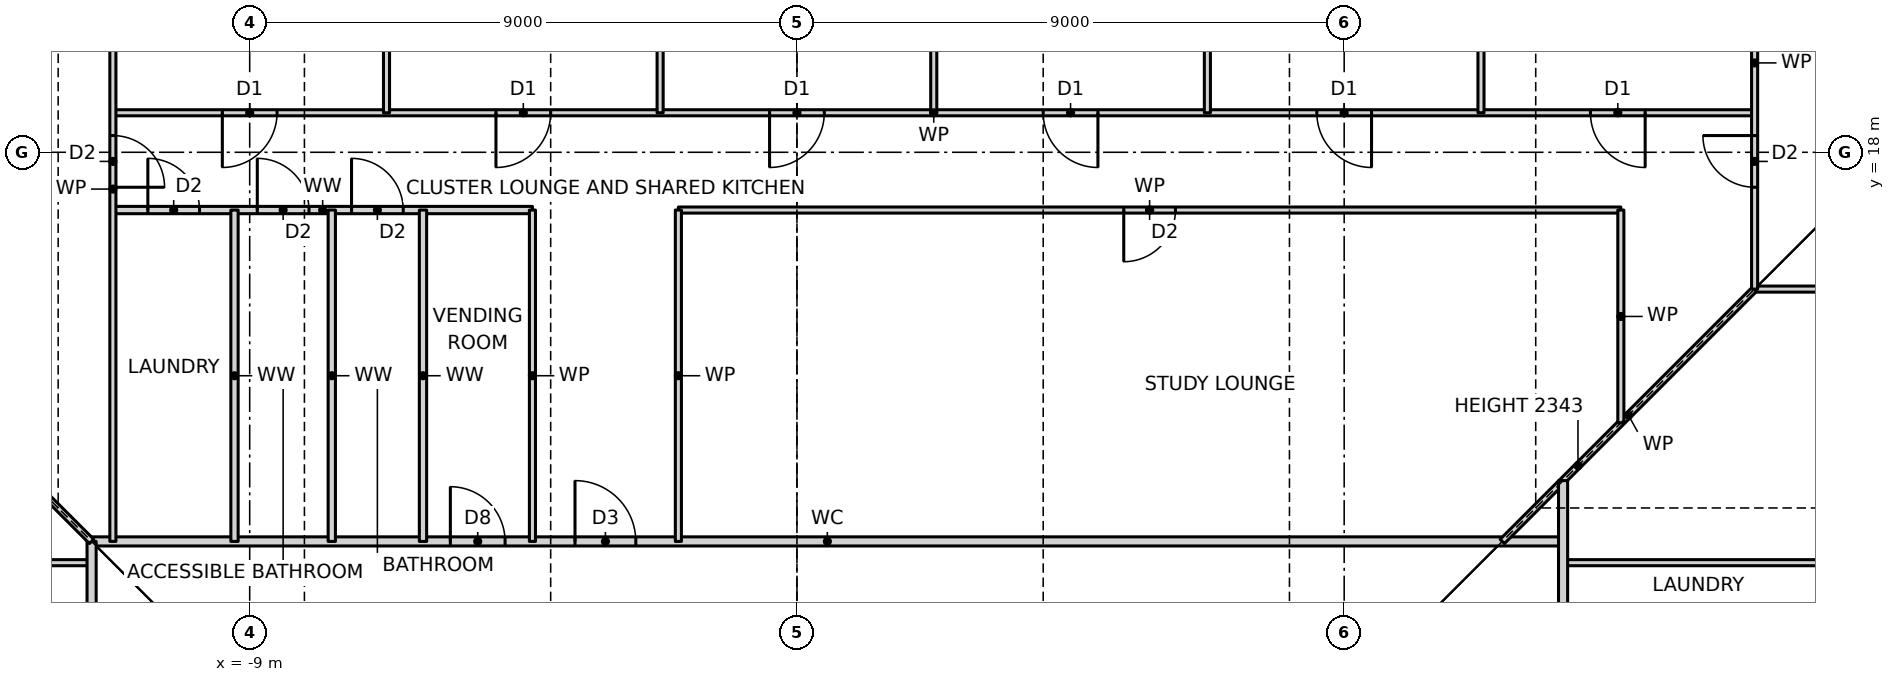
"""IFC4 building model, lengths in metres.
Left out: names, types, materials, properties, quantities, classifications, styles, units other than length and angle.
Written with IfcOpenShell. Run it as: python <this file> out.ifc"""

import sys

from ifc_helpers import new_model, si_unit, direction, frame, frame_2d, origin, place, context, subcontext, project, spatial, rectangle, extrude, element, fill, save


model = new_model("IFC4")
c1 = context("Model", 3, precision=1e-05, world=origin(), true_north=direction((0.0, 1.0)))
c2 = subcontext(c1, "Body", "Model", "MODEL_VIEW")
j1 = project(units=[si_unit("LENGTHUNIT", "METRE"), si_unit("PLANEANGLEUNIT", "RADIAN")], contexts=[c1])
p1 = place(None, origin())
s1 = spatial("IfcSite", under=j1, at=p1, CompositionType="ELEMENT")
p2 = place(p1, origin())
s2 = spatial("IfcBuilding", under=s1, at=p2, CompositionType="ELEMENT")
p3 = place(p2, frame((0.0, 0.0, 67.5)))
s3 = spatial("IfcBuildingStorey", under=s2, at=p3, CompositionType="ELEMENT", Elevation=67.5)
p4 = place(p3, frame((-23.19, 11.25, 0.0), z_axis=(0.0, 0.0, 1.0), x_axis=(1.0, 0.0, 0.0)))
e1 = element("IfcWall", 1, at=p4, inside=s3, PredefinedType="PARTITIONING", context=c2, shape_type="SweptSolid", body=[
    extrude(rectangle(XDim=11.59, YDim=0.1, at=frame_2d((5.795, 0.0))), origin(), (0.0, 0.0, 1.0), 3.27),
])
p5 = place(p4, frame((7.965, 0.0, 0.0)))
e2 = element("IfcOpeningElement", 2, at=p5, cuts=e1, PredefinedType="OPENING", context=c2, shape_type="SweptSolid", body=[
    extrude(rectangle(XDim=1.8, YDim=2.1, at=frame_2d((0.9, 1.05))), frame((0.0, 0.06, 0.0), z_axis=(0.0, -1.0, 0.0), x_axis=(1.0, 0.0, 0.0)), (0.0, 0.0, 1.0), 0.12),
])
p6 = place(p3, frame((12.6, 11.25, 0.0), z_axis=(0.0, 0.0, 1.0), x_axis=(1.0, 0.0, 0.0)))
e3 = element("IfcWall", 3, at=p6, inside=s3, PredefinedType="PARTITIONING", context=c2, shape_type="SweptSolid", body=[
    extrude(rectangle(XDim=10.59, YDim=0.1, at=frame_2d((5.295, 0.0))), origin(), (0.0, 0.0, 1.0), 3.27),
])
p7 = place(p6, frame((4.825, 0.0, 0.0)))
e4 = element("IfcOpeningElement", 4, at=p7, cuts=e3, PredefinedType="OPENING", context=c2, shape_type="SweptSolid", body=[
    extrude(rectangle(XDim=0.85, YDim=2.1, at=frame_2d((0.425, 1.05))), frame((0.0, 0.06, 0.0), z_axis=(0.0, -1.0, 0.0), x_axis=(1.0, 0.0, 0.0)), (0.0, 0.0, 1.0), 0.12),
])
p8 = place(p3, frame((-11.6, 11.6, 0.0), z_axis=(0.0, 0.0, 1.0), x_axis=(1.0, 0.0, 0.0)))
e5 = element("IfcWall", 5, at=p8, inside=s3, PredefinedType="PARTITIONING", context=c2, shape_type="SweptSolid", body=[
    extrude(rectangle(XDim=24.2, YDim=0.15, at=frame_2d((12.1, 0.0))), origin(), (0.0, 0.0, 1.0), 3.27),
])
p9 = place(p8, frame((7.95, 0.0, 0.0)))
e6 = element("IfcOpeningElement", 6, at=p9, cuts=e5, PredefinedType="OPENING", context=c2, shape_type="SweptSolid", body=[
    extrude(rectangle(XDim=1.0, YDim=2.1, at=frame_2d((0.5, 1.05))), frame((0.0, 0.085, 0.0), z_axis=(0.0, -1.0, 0.0), x_axis=(1.0, 0.0, 0.0)), (0.0, 0.0, 1.0), 0.17),
])
p10 = place(p8, frame((5.9, 0.0, 0.0)))
e7 = element("IfcOpeningElement", 7, at=p10, cuts=e5, PredefinedType="OPENING", context=c2, shape_type="SweptSolid", body=[
    extrude(rectangle(XDim=0.9, YDim=2.1, at=frame_2d((0.45, 1.05))), frame((0.0, 0.085, 0.0), z_axis=(0.0, -1.0, 0.0), x_axis=(1.0, 0.0, 0.0)), (0.0, 0.0, 1.0), 0.17),
])
p11 = place(p3, frame((15.75, 15.75, 0.0), z_axis=(0.0, 0.0, 1.0), x_axis=(1.0, 0.0, 0.0)))
e8 = element("IfcWall", 8, at=p11, inside=s3, PredefinedType="PARTITIONING", context=c2, shape_type="SweptSolid", body=[
    extrude(rectangle(XDim=7.44, YDim=0.1, at=frame_2d((3.72, 0.0))), origin(), (0.0, 0.0, 1.0), 3.27),
])
p12 = place(p3, frame((-11.25, 17.05, 0.0), z_axis=(0.0, 0.0, 1.0), x_axis=(1.0, 0.0, 0.0)))
e9 = element("IfcWall", 9, at=p12, inside=s3, PredefinedType="PARTITIONING", context=c2, shape_type="SweptSolid", body=[
    extrude(rectangle(XDim=6.9, YDim=0.12, at=frame_2d((3.45, 0.0))), origin(), (0.0, 0.0, 1.0), 3.27),
])
p13 = place(p12, frame((3.925, 0.0, 0.0)))
e10 = element("IfcOpeningElement", 10, at=p13, cuts=e9, PredefinedType="OPENING", context=c2, shape_type="SweptSolid", body=[
    extrude(rectangle(XDim=0.85, YDim=2.1, at=frame_2d((0.425, 1.05))), frame((0.0, 0.07, 0.0), z_axis=(0.0, -1.0, 0.0), x_axis=(1.0, 0.0, 0.0)), (0.0, 0.0, 1.0), 0.14),
])
p14 = place(p12, frame((2.375, 0.0, 0.0)))
e11 = element("IfcOpeningElement", 11, at=p14, cuts=e9, PredefinedType="OPENING", context=c2, shape_type="SweptSolid", body=[
    extrude(rectangle(XDim=0.85, YDim=2.1, at=frame_2d((0.425, 1.05))), frame((0.0, 0.07, 0.0), z_axis=(0.0, -1.0, 0.0), x_axis=(1.0, 0.0, 0.0)), (0.0, 0.0, 1.0), 0.14),
])
p15 = place(p12, frame((0.575, 0.0, 0.0)))
e12 = element("IfcOpeningElement", 12, at=p15, cuts=e9, PredefinedType="OPENING", context=c2, shape_type="SweptSolid", body=[
    extrude(rectangle(XDim=0.85, YDim=2.1, at=frame_2d((0.425, 1.05))), frame((0.0, 0.07, 0.0), z_axis=(0.0, -1.0, 0.0), x_axis=(1.0, 0.0, 0.0)), (0.0, 0.0, 1.0), 0.14),
])
p16 = place(p3, frame((-1.95, 17.05, 0.0), z_axis=(0.0, 0.0, 1.0), x_axis=(1.0, 0.0, 0.0)))
e13 = element("IfcWall", 13, at=p16, inside=s3, PredefinedType="PARTITIONING", context=c2, shape_type="SweptSolid", body=[
    extrude(rectangle(XDim=15.5, YDim=0.1, at=frame_2d((7.75, 0.0))), origin(), (0.0, 0.0, 1.0), 3.27),
])
p17 = place(p16, frame((7.325, 0.0, 0.0)))
e14 = element("IfcOpeningElement", 14, at=p17, cuts=e13, PredefinedType="OPENING", context=c2, shape_type="SweptSolid", body=[
    extrude(rectangle(XDim=0.85, YDim=2.1, at=frame_2d((0.425, 1.05))), frame((0.0, 0.06, 0.0), z_axis=(0.0, -1.0, 0.0), x_axis=(1.0, 0.0, 0.0)), (0.0, 0.0, 1.0), 0.12),
])
p18 = place(p3, frame((-11.25, 18.65, 0.0), z_axis=(0.0, 0.0, 1.0), x_axis=(1.0, 0.0, 0.0)))
e15 = element("IfcWall", 15, at=p18, inside=s3, PredefinedType="PARTITIONING", context=c2, shape_type="SweptSolid", body=[
    extrude(rectangle(XDim=27.0, YDim=0.1, at=frame_2d((13.5, 0.0))), origin(), (0.0, 0.0, 1.0), 3.27),
])
p19 = place(p18, frame((24.3, 0.0, 0.0)))
e16 = element("IfcOpeningElement", 16, at=p19, cuts=e15, PredefinedType="OPENING", context=c2, shape_type="SweptSolid", body=[
    extrude(rectangle(XDim=0.9, YDim=2.1, at=frame_2d((0.45, 1.05))), frame((0.0, 0.06, 0.0), z_axis=(0.0, -1.0, 0.0), x_axis=(1.0, 0.0, 0.0)), (0.0, 0.0, 1.0), 0.12),
])
p20 = place(p18, frame((19.8, 0.0, 0.0)))
e17 = element("IfcOpeningElement", 17, at=p20, cuts=e15, PredefinedType="OPENING", context=c2, shape_type="SweptSolid", body=[
    extrude(rectangle(XDim=0.9, YDim=2.1, at=frame_2d((0.45, 1.05))), frame((0.0, 0.06, 0.0), z_axis=(0.0, -1.0, 0.0), x_axis=(1.0, 0.0, 0.0)), (0.0, 0.0, 1.0), 0.12),
])
p21 = place(p18, frame((15.3, 0.0, 0.0)))
e18 = element("IfcOpeningElement", 18, at=p21, cuts=e15, PredefinedType="OPENING", context=c2, shape_type="SweptSolid", body=[
    extrude(rectangle(XDim=0.9, YDim=2.1, at=frame_2d((0.45, 1.05))), frame((0.0, 0.06, 0.0), z_axis=(0.0, -1.0, 0.0), x_axis=(1.0, 0.0, 0.0)), (0.0, 0.0, 1.0), 0.12),
])
p22 = place(p18, frame((10.8, 0.0, 0.0)))
e19 = element("IfcOpeningElement", 19, at=p22, cuts=e15, PredefinedType="OPENING", context=c2, shape_type="SweptSolid", body=[
    extrude(rectangle(XDim=0.9, YDim=2.1, at=frame_2d((0.45, 1.05))), frame((0.0, 0.06, 0.0), z_axis=(0.0, -1.0, 0.0), x_axis=(1.0, 0.0, 0.0)), (0.0, 0.0, 1.0), 0.12),
])
p23 = place(p18, frame((6.3, 0.0, 0.0)))
e20 = element("IfcOpeningElement", 20, at=p23, cuts=e15, PredefinedType="OPENING", context=c2, shape_type="SweptSolid", body=[
    extrude(rectangle(XDim=0.9, YDim=2.1, at=frame_2d((0.45, 1.05))), frame((0.0, 0.06, 0.0), z_axis=(0.0, -1.0, 0.0), x_axis=(1.0, 0.0, 0.0)), (0.0, 0.0, 1.0), 0.12),
])
p24 = place(p18, frame((1.8, 0.0, 0.0)))
e21 = element("IfcOpeningElement", 21, at=p24, cuts=e15, PredefinedType="OPENING", context=c2, shape_type="SweptSolid", body=[
    extrude(rectangle(XDim=0.9, YDim=2.1, at=frame_2d((0.45, 1.05))), frame((0.0, 0.06, 0.0), z_axis=(0.0, -1.0, 0.0), x_axis=(1.0, 0.0, 0.0)), (0.0, 0.0, 1.0), 0.12),
])
p25 = place(p3, frame((11.6, 11.6, 0.0), z_axis=(0.0, 0.0, 1.0), x_axis=(0.707106781187, 0.707106781187, 0.0)))
e22 = element("IfcWall", 22, at=p25, inside=s3, PredefinedType="PARTITIONING", context=c2, shape_type="SweptSolid", body=[
    extrude(rectangle(XDim=5.869, YDim=0.1, at=frame_2d((2.935, 0.0))), origin(), (0.0, 0.0, 1.0), 2.343),
])
p26 = place(p3, frame((15.75, 15.75, 0.0), z_axis=(0.0, 0.0, 1.0), x_axis=(0.0, 1.0, 0.0)))
e23 = element("IfcWall", 23, at=p26, inside=s3, PredefinedType="PARTITIONING", context=c2, shape_type="SweptSolid", body=[
    extrude(rectangle(XDim=7.44, YDim=0.1, at=frame_2d((3.72, 0.0))), origin(), (0.0, 0.0, 1.0), 3.27),
])
p27 = place(p26, frame((1.675, 0.0, 0.0)))
e24 = element("IfcOpeningElement", 24, at=p27, cuts=e23, PredefinedType="OPENING", context=c2, shape_type="SweptSolid", body=[
    extrude(rectangle(XDim=0.85, YDim=2.1, at=frame_2d((0.425, 1.05))), frame((0.0, 0.06, 0.0), z_axis=(0.0, -1.0, 0.0), x_axis=(1.0, 0.0, 0.0)), (0.0, 0.0, 1.0), 0.12),
])
p28 = place(p3, frame((13.55, 13.55, 0.0), z_axis=(0.0, 0.0, 1.0), x_axis=(0.0, 1.0, 0.0)))
e25 = element("IfcWall", 25, at=p28, inside=s3, PredefinedType="PARTITIONING", context=c2, shape_type="SweptSolid", body=[
    extrude(rectangle(XDim=3.5, YDim=0.1, at=frame_2d((1.75, 0.0))), origin(), (0.0, 0.0, 1.0), 3.27),
])
p29 = place(p3, frame((12.6, -12.6, 0.0), z_axis=(0.0, 0.0, 1.0), x_axis=(0.0, 1.0, 0.0)))
e26 = element("IfcWall", 26, at=p29, inside=s3, PredefinedType="PARTITIONING", context=c2, shape_type="SweptSolid", body=[
    extrude(rectangle(XDim=25.2, YDim=0.15, at=frame_2d((12.6, 0.0))), origin(), (0.0, 0.0, 1.0), 3.27),
])
p30 = place(p29, frame((17.05, 0.0, 0.0)))
e27 = element("IfcOpeningElement", 27, at=p30, cuts=e26, PredefinedType="OPENING", context=c2, shape_type="SweptSolid", body=[
    extrude(rectangle(XDim=1.0, YDim=2.1, at=frame_2d((0.5, 1.05))), frame((0.0, 0.085, 0.0), z_axis=(0.0, -1.0, 0.0), x_axis=(1.0, 0.0, 0.0)), (0.0, 0.0, 1.0), 0.17),
])
for number, where, z_axis, x_axis in (
    (28, (11.25, 18.65, 0.0), (0.0, 0.0, 1.0), (0.0, 1.0, 0.0)),
    (29, (6.75, 18.65, 0.0), (0.0, 0.0, 1.0), (0.0, 1.0, 0.0)),
    (30, (2.25, 18.65, 0.0), (0.0, 0.0, 1.0), (0.0, 1.0, 0.0)),
):
    element("IfcWall", number, at=place(p3, frame(where, z_axis=z_axis, x_axis=x_axis)), inside=s3, PredefinedType="PARTITIONING", context=c2, shape_type="SweptSolid", body=[
        extrude(rectangle(XDim=4.54, YDim=0.1, at=frame_2d((2.27, 0.0))), origin(), (0.0, 0.0, 1.0), 3.27),
    ])
p31 = place(p3, frame((-1.95, 11.6, 0.0), z_axis=(0.0, 0.0, 1.0), x_axis=(0.0, 1.0, 0.0)))
e31 = element("IfcWall", 31, at=p31, inside=s3, PredefinedType="PARTITIONING", context=c2, shape_type="SweptSolid", body=[
    extrude(rectangle(XDim=5.45, YDim=0.1, at=frame_2d((2.725, 0.0))), origin(), (0.0, 0.0, 1.0), 3.27),
])
p32 = place(p3, frame((-2.25, 18.65, 0.0), z_axis=(0.0, 0.0, 1.0), x_axis=(0.0, 1.0, 0.0)))
e32 = element("IfcWall", 32, at=p32, inside=s3, PredefinedType="PARTITIONING", context=c2, shape_type="SweptSolid", body=[
    extrude(rectangle(XDim=4.54, YDim=0.1, at=frame_2d((2.27, 0.0))), origin(), (0.0, 0.0, 1.0), 3.27),
])
p33 = place(p3, frame((-4.35, 11.6, 0.0), z_axis=(0.0, 0.0, 1.0), x_axis=(0.0, 1.0, 0.0)))
e33 = element("IfcWall", 33, at=p33, inside=s3, PredefinedType="PARTITIONING", context=c2, shape_type="SweptSolid", body=[
    extrude(rectangle(XDim=5.45, YDim=0.1, at=frame_2d((2.725, 0.0))), origin(), (0.0, 0.0, 1.0), 3.27),
])
p34 = place(p3, frame((-6.15, 11.6, 0.0), z_axis=(0.0, 0.0, 1.0), x_axis=(0.0, 1.0, 0.0)))
e34 = element("IfcWall", 34, at=p34, inside=s3, PredefinedType="PARTITIONING", context=c2, shape_type="SweptSolid", body=[
    extrude(rectangle(XDim=5.45, YDim=0.12, at=frame_2d((2.725, 0.0))), origin(), (0.0, 0.0, 1.0), 3.27),
])
p35 = place(p3, frame((-6.75, 18.65, 0.0), z_axis=(0.0, 0.0, 1.0), x_axis=(0.0, 1.0, 0.0)))
e35 = element("IfcWall", 35, at=p35, inside=s3, PredefinedType="PARTITIONING", context=c2, shape_type="SweptSolid", body=[
    extrude(rectangle(XDim=4.54, YDim=0.1, at=frame_2d((2.27, 0.0))), origin(), (0.0, 0.0, 1.0), 3.27),
])
for number, where, z_axis, x_axis in (
    (36, (-7.65, 11.6, 0.0), (0.0, 0.0, 1.0), (0.0, 1.0, 0.0)),
    (37, (-9.25, 11.6, 0.0), (0.0, 0.0, 1.0), (0.0, 1.0, 0.0)),
):
    element("IfcWall", number, at=place(p3, frame(where, z_axis=z_axis, x_axis=x_axis)), inside=s3, PredefinedType="PARTITIONING", context=c2, shape_type="SweptSolid", body=[
        extrude(rectangle(XDim=5.45, YDim=0.12, at=frame_2d((2.725, 0.0))), origin(), (0.0, 0.0, 1.0), 3.27),
    ])
p36 = place(p3, frame((-11.25, 11.6, 0.0), z_axis=(0.0, 0.0, 1.0), x_axis=(0.0, 1.0, 0.0)))
e38 = element("IfcWall", 38, at=p36, inside=s3, PredefinedType="PARTITIONING", context=c2, shape_type="SweptSolid", body=[
    extrude(rectangle(XDim=11.59, YDim=0.1, at=frame_2d((5.795, 0.0))), origin(), (0.0, 0.0, 1.0), 3.27),
])
p37 = place(p36, frame((5.825, 0.0, 0.0)))
e39 = element("IfcOpeningElement", 39, at=p37, cuts=e38, PredefinedType="OPENING", context=c2, shape_type="SweptSolid", body=[
    extrude(rectangle(XDim=0.85, YDim=2.1, at=frame_2d((0.425, 1.05))), frame((0.0, 0.06, 0.0), z_axis=(0.0, -1.0, 0.0), x_axis=(1.0, 0.0, 0.0)), (0.0, 0.0, 1.0), 0.12),
])
p38 = place(p3, frame((-11.6, -11.6, 0.0), z_axis=(0.0, 0.0, 1.0), x_axis=(0.0, 1.0, 0.0)))
e40 = element("IfcWall", 40, at=p38, inside=s3, PredefinedType="PARTITIONING", context=c2, shape_type="SweptSolid", body=[
    extrude(rectangle(XDim=23.2, YDim=0.15, at=frame_2d((11.6, 0.0))), origin(), (0.0, 0.0, 1.0), 3.27),
])
p39 = place(p38, frame((18.6, 0.0, 0.0)))
e41 = element("IfcOpeningElement", 41, at=p39, cuts=e40, PredefinedType="OPENING", context=c2, shape_type="SweptSolid", body=[
    extrude(rectangle(XDim=1.0, YDim=2.1, at=frame_2d((0.5, 1.05))), frame((0.0, 0.085, 0.0), z_axis=(0.0, -1.0, 0.0), x_axis=(1.0, 0.0, 0.0)), (0.0, 0.0, 1.0), 0.17),
])
p40 = place(p38, frame((1.175, 0.0, 0.0)))
e42 = element("IfcOpeningElement", 42, at=p40, cuts=e40, PredefinedType="OPENING", context=c2, shape_type="SweptSolid", body=[
    extrude(rectangle(XDim=1.0, YDim=2.1, at=frame_2d((0.5, 1.05))), frame((0.0, 0.085, 0.0), z_axis=(0.0, -1.0, 0.0), x_axis=(1.0, 0.0, 0.0)), (0.0, 0.0, 1.0), 0.17),
])
p41 = place(p3, frame((-11.6, 11.6, 0.0), z_axis=(0.0, 0.0, 1.0), x_axis=(-0.707106781187, 0.707106781187, 0.0)))
e43 = element("IfcWall", 43, at=p41, inside=s3, PredefinedType="PARTITIONING", context=c2, shape_type="SweptSolid", body=[
    extrude(rectangle(XDim=5.869, YDim=0.1, at=frame_2d((2.935, 0.0))), origin(), (0.0, 0.0, 1.0), 2.343),
])
p42 = place(p19, frame((0.9, 0.0, 0.0), z_axis=(0.0, 0.0, 1.0), x_axis=(-1.0, 0.0, 0.0)))
e44 = element("IfcDoor", 44, at=p42, inside=s3, OperationType="SINGLE_SWING_LEFT", PredefinedType="DOOR", context=c2, shape_type="SweptSolid", body=[
    extrude(rectangle(XDim=0.9, YDim=2.1, at=frame_2d((0.45, 1.05))), frame((0.0, 0.025, 0.0), z_axis=(0.0, -1.0, 0.0), x_axis=(1.0, 0.0, 0.0)), (0.0, 0.0, 1.0), 0.05),
])
fill(e16, e44)
p43 = place(p20, frame((0.9, 0.0, 0.0), z_axis=(0.0, 0.0, 1.0), x_axis=(-1.0, 0.0, 0.0)))
e45 = element("IfcDoor", 45, at=p43, inside=s3, OperationType="SINGLE_SWING_LEFT", PredefinedType="DOOR", context=c2, shape_type="SweptSolid", body=[
    extrude(rectangle(XDim=0.9, YDim=2.1, at=frame_2d((0.45, 1.05))), frame((0.0, 0.025, 0.0), z_axis=(0.0, -1.0, 0.0), x_axis=(1.0, 0.0, 0.0)), (0.0, 0.0, 1.0), 0.05),
])
fill(e17, e45)
p44 = place(p21, frame((0.9, 0.0, 0.0), z_axis=(0.0, 0.0, 1.0), x_axis=(-1.0, 0.0, 0.0)))
e46 = element("IfcDoor", 46, at=p44, inside=s3, OperationType="SINGLE_SWING_LEFT", PredefinedType="DOOR", context=c2, shape_type="SweptSolid", body=[
    extrude(rectangle(XDim=0.9, YDim=2.1, at=frame_2d((0.45, 1.05))), frame((0.0, 0.025, 0.0), z_axis=(0.0, -1.0, 0.0), x_axis=(1.0, 0.0, 0.0)), (0.0, 0.0, 1.0), 0.05),
])
fill(e18, e46)
p45 = place(p22, frame((0.9, 0.0, 0.0), z_axis=(0.0, 0.0, 1.0), x_axis=(-1.0, 0.0, 0.0)))
e47 = element("IfcDoor", 47, at=p45, inside=s3, OperationType="SINGLE_SWING_RIGHT", PredefinedType="DOOR", context=c2, shape_type="SweptSolid", body=[
    extrude(rectangle(XDim=0.9, YDim=2.1, at=frame_2d((0.45, 1.05))), frame((0.0, 0.025, 0.0), z_axis=(0.0, -1.0, 0.0), x_axis=(1.0, 0.0, 0.0)), (0.0, 0.0, 1.0), 0.05),
])
fill(e19, e47)
p46 = place(p23, frame((0.9, 0.0, 0.0), z_axis=(0.0, 0.0, 1.0), x_axis=(-1.0, 0.0, 0.0)))
e48 = element("IfcDoor", 48, at=p46, inside=s3, OperationType="SINGLE_SWING_RIGHT", PredefinedType="DOOR", context=c2, shape_type="SweptSolid", body=[
    extrude(rectangle(XDim=0.9, YDim=2.1, at=frame_2d((0.45, 1.05))), frame((0.0, 0.025, 0.0), z_axis=(0.0, -1.0, 0.0), x_axis=(1.0, 0.0, 0.0)), (0.0, 0.0, 1.0), 0.05),
])
fill(e20, e48)
p47 = place(p24, frame((0.9, 0.0, 0.0), z_axis=(0.0, 0.0, 1.0), x_axis=(-1.0, 0.0, 0.0)))
e49 = element("IfcDoor", 49, at=p47, inside=s3, OperationType="SINGLE_SWING_RIGHT", PredefinedType="DOOR", context=c2, shape_type="SweptSolid", body=[
    extrude(rectangle(XDim=0.9, YDim=2.1, at=frame_2d((0.45, 1.05))), frame((0.0, 0.025, 0.0), z_axis=(0.0, -1.0, 0.0), x_axis=(1.0, 0.0, 0.0)), (0.0, 0.0, 1.0), 0.05),
])
fill(e21, e49)
p48 = place(p9, origin())
e50 = element("IfcDoor", 50, at=p48, inside=s3, OperationType="SINGLE_SWING_LEFT", PredefinedType="DOOR", context=c2, shape_type="SweptSolid", body=[
    extrude(rectangle(XDim=1.0, YDim=2.1, at=frame_2d((0.5, 1.05))), frame((0.0, 0.025, 0.0), z_axis=(0.0, -1.0, 0.0), x_axis=(1.0, 0.0, 0.0)), (0.0, 0.0, 1.0), 0.05),
])
fill(e6, e50)
p49 = place(p17, frame((0.85, 0.0, 0.0), z_axis=(0.0, 0.0, 1.0), x_axis=(-1.0, 0.0, 0.0)))
e51 = element("IfcDoor", 51, at=p49, inside=s3, OperationType="SINGLE_SWING_RIGHT", PredefinedType="DOOR", context=c2, shape_type="SweptSolid", body=[
    extrude(rectangle(XDim=0.85, YDim=2.1, at=frame_2d((0.425, 1.05))), frame((0.0, 0.025, 0.0), z_axis=(0.0, -1.0, 0.0), x_axis=(1.0, 0.0, 0.0)), (0.0, 0.0, 1.0), 0.05),
])
fill(e14, e51)
p50 = place(p10, origin())
e52 = element("IfcDoor", 52, at=p50, inside=s3, OperationType="SINGLE_SWING_LEFT", PredefinedType="DOOR", context=c2, shape_type="SweptSolid", body=[
    extrude(rectangle(XDim=0.9, YDim=2.1, at=frame_2d((0.45, 1.05))), frame((0.0, 0.025, 0.0), z_axis=(0.0, -1.0, 0.0), x_axis=(1.0, 0.0, 0.0)), (0.0, 0.0, 1.0), 0.05),
])
fill(e7, e52)
p51 = place(p13, origin())
e53 = element("IfcDoor", 53, at=p51, inside=s3, OperationType="SINGLE_SWING_LEFT", PredefinedType="DOOR", context=c2, shape_type="SweptSolid", body=[
    extrude(rectangle(XDim=0.85, YDim=2.1, at=frame_2d((0.425, 1.05))), frame((0.0, 0.025, 0.0), z_axis=(0.0, -1.0, 0.0), x_axis=(1.0, 0.0, 0.0)), (0.0, 0.0, 1.0), 0.05),
])
fill(e10, e53)
p52 = place(p14, origin())
e54 = element("IfcDoor", 54, at=p52, inside=s3, OperationType="SINGLE_SWING_LEFT", PredefinedType="DOOR", context=c2, shape_type="SweptSolid", body=[
    extrude(rectangle(XDim=0.85, YDim=2.1, at=frame_2d((0.425, 1.05))), frame((0.0, 0.025, 0.0), z_axis=(0.0, -1.0, 0.0), x_axis=(1.0, 0.0, 0.0)), (0.0, 0.0, 1.0), 0.05),
])
fill(e11, e54)
p53 = place(p15, origin())
e55 = element("IfcDoor", 55, at=p53, inside=s3, OperationType="SINGLE_SWING_LEFT", PredefinedType="DOOR", context=c2, shape_type="SweptSolid", body=[
    extrude(rectangle(XDim=0.85, YDim=2.1, at=frame_2d((0.425, 1.05))), frame((0.0, 0.025, 0.0), z_axis=(0.0, -1.0, 0.0), x_axis=(1.0, 0.0, 0.0)), (0.0, 0.0, 1.0), 0.05),
])
fill(e12, e55)
p54 = place(p37, frame((0.85, 0.0, 0.0), z_axis=(0.0, 0.0, 1.0), x_axis=(-1.0, 0.0, 0.0)))
e56 = element("IfcDoor", 56, at=p54, inside=s3, OperationType="SINGLE_SWING_RIGHT", PredefinedType="DOOR", context=c2, shape_type="SweptSolid", body=[
    extrude(rectangle(XDim=0.85, YDim=2.1, at=frame_2d((0.425, 1.05))), frame((0.0, 0.025, 0.0), z_axis=(0.0, -1.0, 0.0), x_axis=(1.0, 0.0, 0.0)), (0.0, 0.0, 1.0), 0.05),
])
fill(e39, e56)
p55 = place(p27, origin())
e57 = element("IfcDoor", 57, at=p55, inside=s3, OperationType="SINGLE_SWING_RIGHT", PredefinedType="DOOR", context=c2, shape_type="SweptSolid", body=[
    extrude(rectangle(XDim=0.85, YDim=2.1, at=frame_2d((0.425, 1.05))), frame((0.0, 0.025, 0.0), z_axis=(0.0, -1.0, 0.0), x_axis=(1.0, 0.0, 0.0)), (0.0, 0.0, 1.0), 0.05),
])
fill(e24, e57)
save(model, sys.argv[1])
